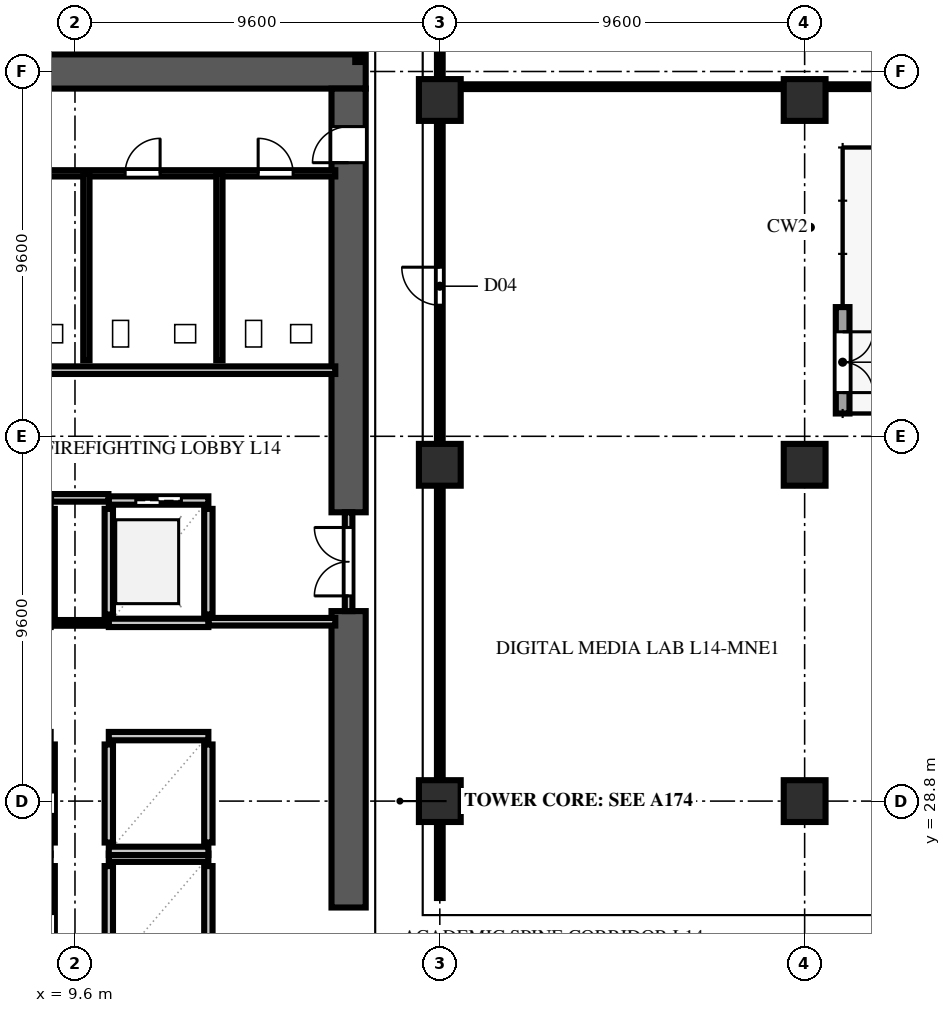
"""IFC4 building model, lengths in metres.
Left out: names, types, materials, properties, quantities, classifications, styles, units other than length and angle.
Written with IfcOpenShell. Run it as: python <this file> out.ifc"""

import sys

from ifc_helpers import new_model, si_unit, direction, frame, frame_2d, origin, origin_2d, place, context, subcontext, project, spatial, rectangle, extrude, element, fill, save


model = new_model("IFC4")
c1 = context("Model", 3, precision=1e-05, world=origin(), true_north=direction((0.0, 1.0)))
c2 = subcontext(c1, "Body", "Model", "MODEL_VIEW")
j1 = project(units=[si_unit("LENGTHUNIT", "METRE"), si_unit("PLANEANGLEUNIT", "RADIAN")], contexts=[c1])
p1 = place(None, origin())
s1 = spatial("IfcSite", under=j1, at=p1, CompositionType="ELEMENT")
p2 = place(p1, origin())
s2 = spatial("IfcBuilding", under=s1, at=p2, CompositionType="ELEMENT")
p3 = place(p2, frame((0.0, 0.0, 58.4)))
s3 = spatial("IfcBuildingStorey", under=s2, at=p3, CompositionType="ELEMENT", Elevation=58.4)
p4 = place(p3, frame((2.65, 48.0, 0.0), z_axis=(0.0, 0.0, 1.0), x_axis=(1.0, 0.0, 0.0)))
e1 = element("IfcWall", 1, at=p4, inside=s3, PredefinedType="SHEAR", context=c2, shape_type="SweptSolid", body=[
    extrude(rectangle(XDim=14.6, YDim=0.9, at=frame_2d((7.3, 0.0))), origin(), (0.0, 0.0, 1.0), 3.54),
])
p5 = place(p3, frame((16.8, 26.0, 0.0), z_axis=(0.0, 0.0, 1.0), x_axis=(0.0, 1.0, 0.0)))
e2 = element("IfcWall", 2, at=p5, inside=s3, PredefinedType="SHEAR", context=c2, shape_type="SweptSolid", body=[
    extrude(rectangle(XDim=7.8, YDim=0.9, at=frame_2d((3.9, 0.0))), origin(), (0.0, 0.0, 1.0), 3.54),
])
p6 = place(p3, frame((16.8, 36.4, 0.0), z_axis=(0.0, 0.0, 1.0), x_axis=(0.0, 1.0, 0.0)))
e3 = element("IfcWall", 3, at=p6, inside=s3, PredefinedType="SHEAR", context=c2, shape_type="SweptSolid", body=[
    extrude(rectangle(XDim=11.15, YDim=0.9, at=frame_2d((5.575, 0.0))), origin(), (0.0, 0.0, 1.0), 3.54),
])
p7 = place(p6, frame((9.2, 0.0, 0.0)))
e4 = element("IfcOpeningElement", 4, at=p7, cuts=e3, PredefinedType="OPENING", context=c2, shape_type="SweptSolid", body=[
    extrude(rectangle(XDim=0.95, YDim=2.15, at=frame_2d((0.475, 1.075))), frame((0.0, 0.462, 0.0), z_axis=(0.0, -1.0, 0.0), x_axis=(1.0, 0.0, 0.0)), (0.0, 0.0, 1.0), 0.924),
])
for number, where, z_axis, x_axis in (
    (5, (19.2, 28.8, 0.0), (0.0, 0.0, 1.0), (1.0, 0.0, 0.0)),
    (6, (19.2, 37.65, 0.0), (0.0, 0.0, 1.0), (1.0, 0.0, 0.0)),
    (7, (19.2, 47.25, 0.0), (0.0, 0.0, 1.0), (1.0, 0.0, 0.0)),
    (8, (28.8, 28.8, 0.0), (0.0, 0.0, 1.0), (1.0, 0.0, 0.0)),
    (9, (28.8, 37.65, 0.0), (0.0, 0.0, 1.0), (1.0, 0.0, 0.0)),
    (10, (28.8, 47.25, 0.0), (0.0, 0.0, 1.0), (1.0, 0.0, 0.0)),
):
    element("IfcColumn", number, at=place(p3, frame(where, z_axis=z_axis, x_axis=x_axis)), inside=s3, PredefinedType="COLUMN", context=c2, shape_type="SweptSolid", body=[
        extrude(rectangle(XDim=1.1, YDim=1.1, at=origin_2d()), origin(), (0.0, 0.0, 1.0), 3.8),
    ])
p8 = place(p3, frame((29.8, 39.0, 0.0), z_axis=(0.0, 0.0, 1.0), x_axis=(0.0, 1.0, 0.0)))
e11 = element("IfcWall", 11, at=p8, inside=s3, PredefinedType="SOLIDWALL", context=c2, shape_type="SweptSolid", body=[
    extrude(rectangle(XDim=2.8, YDim=0.36, at=frame_2d((1.4, 0.0))), origin(), (0.0, 0.0, 1.0), 3.54),
])
p9 = place(p8, frame((0.55, 0.0, 0.0)))
e12 = element("IfcOpeningElement", 12, at=p9, cuts=e11, PredefinedType="OPENING", context=c2, shape_type="SweptSolid", body=[
    extrude(rectangle(XDim=1.6, YDim=2.3, at=frame_2d((0.8, 1.15))), frame((0.0, 0.192, 0.0), z_axis=(0.0, -1.0, 0.0), x_axis=(1.0, 0.0, 0.0)), (0.0, 0.0, 1.0), 0.384),
])
p10 = place(p3, frame((8.96, 24.51, 0.0), z_axis=(0.0, 0.0, 1.0), x_axis=(0.0, 1.0, 0.0)))
e13 = element("IfcWall", 13, at=p10, inside=s3, PredefinedType="SOLIDWALL", context=c2, shape_type="SweptSolid", body=[
    extrude(rectangle(XDim=2.58, YDim=0.22, at=frame_2d((1.29, 0.0))), origin(), (0.0, 0.0, 1.0), 3.54),
])
p11 = place(p10, frame((0.74, 0.0, 0.0)))
e14 = element("IfcOpeningElement", 14, at=p11, cuts=e13, PredefinedType="OPENING", context=c2, shape_type="SweptSolid", body=[
    extrude(rectangle(XDim=1.1, YDim=2.2, at=frame_2d((0.55, 1.1))), frame((0.0, 0.122, 0.0), z_axis=(0.0, -1.0, 0.0), x_axis=(1.0, 0.0, 0.0)), (0.0, 0.0, 1.0), 0.244),
])
p12 = place(p3, frame((8.96, 27.71, 0.0), z_axis=(0.0, 0.0, 1.0), x_axis=(0.0, 1.0, 0.0)))
e15 = element("IfcWall", 15, at=p12, inside=s3, PredefinedType="SOLIDWALL", context=c2, shape_type="SweptSolid", body=[
    extrude(rectangle(XDim=2.58, YDim=0.22, at=frame_2d((1.29, 0.0))), origin(), (0.0, 0.0, 1.0), 3.54),
])
p13 = place(p12, frame((0.74, 0.0, 0.0)))
e16 = element("IfcOpeningElement", 16, at=p13, cuts=e15, PredefinedType="OPENING", context=c2, shape_type="SweptSolid", body=[
    extrude(rectangle(XDim=1.1, YDim=2.2, at=frame_2d((0.55, 1.1))), frame((0.0, 0.122, 0.0), z_axis=(0.0, -1.0, 0.0), x_axis=(1.0, 0.0, 0.0)), (0.0, 0.0, 1.0), 0.244),
])
for number, where, z_axis, x_axis in (
    (17, (10.49, 24.51, 0.0), (0.0, 0.0, 1.0), (0.0, 1.0, 0.0)),
    (18, (13.11, 24.51, 0.0), (0.0, 0.0, 1.0), (0.0, 1.0, 0.0)),
):
    element("IfcWall", number, at=place(p3, frame(where, z_axis=z_axis, x_axis=x_axis)), inside=s3, PredefinedType="SOLIDWALL", context=c2, shape_type="SweptSolid", body=[
        extrude(rectangle(XDim=2.58, YDim=0.22, at=frame_2d((1.29, 0.0))), origin(), (0.0, 0.0, 1.0), 3.54),
    ])
p14 = place(p3, frame((10.49, 27.31, 0.0), z_axis=(0.0, 0.0, 1.0), x_axis=(1.0, 0.0, 0.0)))
e19 = element("IfcWall", 19, at=p14, inside=s3, PredefinedType="SOLIDWALL", context=c2, shape_type="SweptSolid", body=[
    extrude(rectangle(XDim=2.62, YDim=0.22, at=frame_2d((1.31, 0.0))), origin(), (0.0, 0.0, 1.0), 3.54),
])
for number, where, z_axis, x_axis in (
    (20, (10.49, 27.71, 0.0), (0.0, 0.0, 1.0), (0.0, 1.0, 0.0)),
    (21, (13.11, 27.71, 0.0), (0.0, 0.0, 1.0), (0.0, 1.0, 0.0)),
):
    element("IfcWall", number, at=place(p3, frame(where, z_axis=z_axis, x_axis=x_axis)), inside=s3, PredefinedType="SOLIDWALL", context=c2, shape_type="SweptSolid", body=[
        extrude(rectangle(XDim=2.58, YDim=0.22, at=frame_2d((1.29, 0.0))), origin(), (0.0, 0.0, 1.0), 3.54),
    ])
for number, where, z_axis, x_axis in (
    (22, (10.49, 27.49, 0.0), (0.0, 0.0, 1.0), (1.0, 0.0, 0.0)),
    (23, (10.49, 30.51, 0.0), (0.0, 0.0, 1.0), (1.0, 0.0, 0.0)),
):
    element("IfcWall", number, at=place(p3, frame(where, z_axis=z_axis, x_axis=x_axis)), inside=s3, PredefinedType="SOLIDWALL", context=c2, shape_type="SweptSolid", body=[
        extrude(rectangle(XDim=2.62, YDim=0.22, at=frame_2d((1.31, 0.0))), origin(), (0.0, 0.0, 1.0), 3.54),
    ])
for number, where, z_axis, x_axis in (
    (24, (8.96, 33.71, 0.0), (0.0, 0.0, 1.0), (0.0, 1.0, 0.0)),
    (25, (10.49, 33.71, 0.0), (0.0, 0.0, 1.0), (0.0, 1.0, 0.0)),
    (26, (13.11, 33.71, 0.0), (0.0, 0.0, 1.0), (0.0, 1.0, 0.0)),
):
    element("IfcWall", number, at=place(p3, frame(where, z_axis=z_axis, x_axis=x_axis)), inside=s3, PredefinedType="SOLIDWALL", context=c2, shape_type="SweptSolid", body=[
        extrude(rectangle(XDim=2.78, YDim=0.22, at=frame_2d((1.39, 0.0))), origin(), (0.0, 0.0, 1.0), 3.54),
    ])
p15 = place(p3, frame((10.49, 33.49, 0.0), z_axis=(0.0, 0.0, 1.0), x_axis=(1.0, 0.0, 0.0)))
e27 = element("IfcWall", 27, at=p15, inside=s3, PredefinedType="SOLIDWALL", context=c2, shape_type="SweptSolid", body=[
    extrude(rectangle(XDim=2.62, YDim=0.22, at=frame_2d((1.31, 0.0))), origin(), (0.0, 0.0, 1.0), 3.54),
])
p16 = place(p3, frame((10.49, 36.71, 0.0), z_axis=(0.0, 0.0, 1.0), x_axis=(1.0, 0.0, 0.0)))
e28 = element("IfcWall", 28, at=p16, inside=s3, PredefinedType="SOLIDWALL", context=c2, shape_type="SweptSolid", body=[
    extrude(rectangle(XDim=2.62, YDim=0.22, at=frame_2d((1.31, 0.0))), origin(), (0.0, 0.0, 1.0), 3.54),
])
p17 = place(p16, frame((0.71, 0.0, 0.0)))
e29 = element("IfcOpeningElement", 29, at=p17, cuts=e28, PredefinedType="OPENING", context=c2, shape_type="SweptSolid", body=[
    extrude(rectangle(XDim=1.2, YDim=2.2, at=frame_2d((0.6, 1.1))), frame((0.0, 0.122, 0.0), z_axis=(0.0, -1.0, 0.0), x_axis=(1.0, 0.0, 0.0)), (0.0, 0.0, 1.0), 0.244),
])
p18 = place(p3, frame((8.97, 36.78, 0.0), z_axis=(0.0, 0.0, 1.0), x_axis=(1.0, 0.0, 0.0)))
e30 = element("IfcWall", 30, at=p18, inside=s3, PredefinedType="SOLIDWALL", context=c2, shape_type="SweptSolid", body=[
    extrude(rectangle(XDim=1.51, YDim=0.2, at=frame_2d((0.755, 0.0))), origin(), (0.0, 0.0, 1.0), 3.54),
])
p19 = place(p3, frame((13.12, 33.52, 0.0), z_axis=(0.0, 0.0, 1.0), x_axis=(1.0, 0.0, 0.0)))
e31 = element("IfcWall", 31, at=p19, inside=s3, PredefinedType="SOLIDWALL", context=c2, shape_type="SweptSolid", body=[
    extrude(rectangle(XDim=3.33, YDim=0.2, at=frame_2d((1.665, 0.0))), origin(), (0.0, 0.0, 1.0), 3.54),
])
p20 = place(p3, frame((6.32, 40.14, 0.0), z_axis=(0.0, 0.0, 1.0), x_axis=(1.0, 0.0, 0.0)))
e32 = element("IfcWall", 32, at=p20, inside=s3, PredefinedType="SOLIDWALL", context=c2, shape_type="SweptSolid", body=[
    extrude(rectangle(XDim=10.13, YDim=0.2, at=frame_2d((5.065, 0.0))), origin(), (0.0, 0.0, 1.0), 3.54),
])
p21 = place(p3, frame((16.8, 33.8, 0.0), z_axis=(0.0, 0.0, 1.0), x_axis=(0.0, 1.0, 0.0)))
e33 = element("IfcWall", 33, at=p21, inside=s3, PredefinedType="SOLIDWALL", context=c2, shape_type="SweptSolid", body=[
    extrude(rectangle(XDim=2.6, YDim=0.2, at=frame_2d((1.3, 0.0))), origin(), (0.0, 0.0, 1.0), 3.54),
])
p22 = place(p21, frame((0.4, 0.0, 0.0)))
e34 = element("IfcOpeningElement", 34, at=p22, cuts=e33, PredefinedType="OPENING", context=c2, shape_type="SweptSolid", body=[
    extrude(rectangle(XDim=1.8, YDim=2.2, at=frame_2d((0.9, 1.1))), frame((0.0, 0.112, 0.0), z_axis=(0.0, -1.0, 0.0), x_axis=(1.0, 0.0, 0.0)), (0.0, 0.0, 1.0), 0.224),
])
p23 = place(p3, frame((8.965, 33.49, 0.0), z_axis=(0.0, 0.0, 1.0), x_axis=(1.0, 0.0, 0.0)))
e35 = element("IfcWall", 35, at=p23, inside=s3, PredefinedType="PARTITIONING", context=c2, shape_type="SweptSolid", body=[
    extrude(rectangle(XDim=1.52, YDim=0.15, at=frame_2d((0.76, 0.0))), origin(), (0.0, 0.0, 1.0), 3.54),
])
p24 = place(p3, frame((6.32, 45.32, 0.0), z_axis=(0.0, 0.0, 1.0), x_axis=(1.0, 0.0, 0.0)))
e36 = element("IfcWall", 36, at=p24, inside=s3, PredefinedType="PLUMBINGWALL", context=c2, shape_type="SweptSolid", body=[
    extrude(rectangle(XDim=10.13, YDim=0.165, at=frame_2d((5.065, 0.0))), origin(), (0.0, 0.0, 1.0), 3.54),
])
p25 = place(p24, frame((0.9, 0.0, 0.0)))
e37 = element("IfcOpeningElement", 37, at=p25, cuts=e36, PredefinedType="OPENING", context=c2, shape_type="SweptSolid", body=[
    extrude(rectangle(XDim=0.92, YDim=2.15, at=frame_2d((0.46, 1.075))), frame((0.0, 0.094, 0.0), z_axis=(0.0, -1.0, 0.0), x_axis=(1.0, 0.0, 0.0)), (0.0, 0.0, 1.0), 0.189),
])
p26 = place(p24, frame((4.6, 0.0, 0.0)))
e38 = element("IfcOpeningElement", 38, at=p26, cuts=e36, PredefinedType="OPENING", context=c2, shape_type="SweptSolid", body=[
    extrude(rectangle(XDim=0.92, YDim=2.15, at=frame_2d((0.46, 1.075))), frame((0.0, 0.094, 0.0), z_axis=(0.0, -1.0, 0.0), x_axis=(1.0, 0.0, 0.0)), (0.0, 0.0, 1.0), 0.189),
])
p27 = place(p24, frame((8.1, 0.0, 0.0)))
e39 = element("IfcOpeningElement", 39, at=p27, cuts=e36, PredefinedType="OPENING", context=c2, shape_type="SweptSolid", body=[
    extrude(rectangle(XDim=0.92, YDim=2.15, at=frame_2d((0.46, 1.075))), frame((0.0, 0.094, 0.0), z_axis=(0.0, -1.0, 0.0), x_axis=(1.0, 0.0, 0.0)), (0.0, 0.0, 1.0), 0.189),
])
for number, where, z_axis, x_axis in (
    (40, (9.9, 40.4, 0.0), (0.0, 0.0, 1.0), (0.0, 1.0, 0.0)),
    (41, (13.4, 40.4, 0.0), (0.0, 0.0, 1.0), (0.0, 1.0, 0.0)),
):
    element("IfcWall", number, at=place(p3, frame(where, z_axis=z_axis, x_axis=x_axis)), inside=s3, PredefinedType="PLUMBINGWALL", context=c2, shape_type="SweptSolid", body=[
        extrude(rectangle(XDim=4.92, YDim=0.165, at=frame_2d((2.46, 0.0))), origin(), (0.0, 0.0, 1.0), 3.54),
    ])
p28 = place(p3, frame((19.2, 26.25, 0.0), z_axis=(0.0, 0.0, 1.0), x_axis=(0.0, 1.0, 0.0)))
e42 = element("IfcWall", 42, at=p28, inside=s3, PredefinedType="PARTITIONING", context=c2, shape_type="SweptSolid", body=[
    extrude(rectangle(XDim=21.0, YDim=0.15, at=frame_2d((10.5, 0.0))), origin(), (0.0, 0.0, 1.0), 2.845),
])
p29 = place(p28, frame((15.6, 0.0, 0.0)))
e43 = element("IfcOpeningElement", 43, at=p29, cuts=e42, PredefinedType="OPENING", context=c2, shape_type="SweptSolid", body=[
    extrude(rectangle(XDim=1.0, YDim=2.2, at=frame_2d((0.5, 1.1))), frame((0.0, 0.087, 0.0), z_axis=(0.0, -1.0, 0.0), x_axis=(1.0, 0.0, 0.0)), (0.0, 0.0, 1.0), 0.174),
])
p30 = place(p3, frame((19.2, 47.25, 0.0), z_axis=(0.0, 0.0, 1.0), x_axis=(0.0, 1.0, 0.0)))
e44 = element("IfcWall", 44, at=p30, inside=s3, PredefinedType="PARTITIONING", context=c2, shape_type="SweptSolid", body=[
    extrude(rectangle(XDim=0.35, YDim=0.15, at=frame_2d((0.175, 0.0))), origin(), (0.0, 0.0, 1.0), 3.54),
])
p31 = place(p3, frame((19.2, 47.6, 0.0), z_axis=(0.0, 0.0, 1.0), x_axis=(1.0, 0.0, 0.0)))
e45 = element("IfcWall", 45, at=p31, inside=s3, PredefinedType="PARTITIONING", context=c2, shape_type="SweptSolid", body=[
    extrude(rectangle(XDim=18.98, YDim=0.125, at=frame_2d((9.49, 0.0))), origin(), (0.0, 0.0, 1.0), 3.54),
])
p32 = place(p3, frame((19.2, 47.6, 0.0), z_axis=(0.0, 0.0, 1.0), x_axis=(0.0, 1.0, 0.0)))
e46 = element("IfcWall", 46, at=p32, inside=s3, PredefinedType="PARTITIONING", context=c2, shape_type="SweptSolid", body=[
    extrude(rectangle(XDim=18.85, YDim=0.15, at=frame_2d((9.425, 0.0))), origin(), (0.0, 0.0, 1.0), 2.845),
])
p33 = place(p32, frame((3.95, 0.0, 0.0)))
e47 = element("IfcOpeningElement", 47, at=p33, cuts=e46, PredefinedType="OPENING", context=c2, shape_type="SweptSolid", body=[
    extrude(rectangle(XDim=0.95, YDim=2.15, at=frame_2d((0.475, 1.075))), frame((0.0, 0.087, 0.0), z_axis=(0.0, -1.0, 0.0), x_axis=(1.0, 0.0, 0.0)), (0.0, 0.0, 1.0), 0.174),
])
p34 = place(p3, frame((17.05, 48.25, 0.0), z_axis=(0.0, 0.0, 1.0), x_axis=(0.0, 1.0, 0.0)))
e48 = element("IfcWall", 48, at=p34, inside=s3, PredefinedType="PARTITIONING", context=c2, shape_type="SweptSolid", body=[
    extrude(rectangle(XDim=18.73, YDim=0.15, at=frame_2d((9.365, 0.0))), origin(), (0.0, 0.0, 1.0), 3.54),
])
p35 = place(p34, frame((3.4, 0.0, 0.0)))
e49 = element("IfcOpeningElement", 49, at=p35, cuts=e48, PredefinedType="OPENING", context=c2, shape_type="SweptSolid", body=[
    extrude(rectangle(XDim=0.95, YDim=2.15, at=frame_2d((0.475, 1.075))), frame((0.0, 0.087, 0.0), z_axis=(0.0, -1.0, 0.0), x_axis=(1.0, 0.0, 0.0)), (0.0, 0.0, 1.0), 0.174),
])
p36 = place(p9, frame((1.6, 0.0, 0.0), z_axis=(0.0, 0.0, 1.0), x_axis=(-1.0, 0.0, 0.0)))
e50 = element("IfcDoor", 50, at=p36, inside=s3, OperationType="DOUBLE_SWING_LEFT", PredefinedType="DOOR", context=c2, shape_type="SweptSolid", body=[
    extrude(rectangle(XDim=1.6, YDim=2.3, at=frame_2d((0.8, 1.15))), frame((0.0, 0.025, 0.0), z_axis=(0.0, -1.0, 0.0), x_axis=(1.0, 0.0, 0.0)), (0.0, 0.0, 1.0), 0.05),
])
fill(e12, e50)
p37 = place(p17, origin())
e51 = element("IfcDoor", 51, at=p37, inside=s3, OperationType="DOUBLE_DOOR_SLIDING", PredefinedType="DOOR", context=c2, shape_type="SweptSolid", body=[
    extrude(rectangle(XDim=1.2, YDim=2.2, at=frame_2d((0.6, 1.1))), frame((0.0, 0.025, 0.0), z_axis=(0.0, -1.0, 0.0), x_axis=(1.0, 0.0, 0.0)), (0.0, 0.0, 1.0), 0.05),
])
fill(e29, e51)
p38 = place(p7, origin())
e52 = element("IfcDoor", 52, at=p38, inside=s3, OperationType="SINGLE_SWING_LEFT", PredefinedType="DOOR", context=c2, shape_type="SweptSolid", body=[
    extrude(rectangle(XDim=0.95, YDim=2.15, at=frame_2d((0.475, 1.075))), frame((0.0, 0.025, 0.0), z_axis=(0.0, -1.0, 0.0), x_axis=(1.0, 0.0, 0.0)), (0.0, 0.0, 1.0), 0.05),
])
fill(e4, e52)
p39 = place(p22, origin())
e53 = element("IfcDoor", 53, at=p39, inside=s3, OperationType="DOUBLE_DOOR_SINGLE_SWING", PredefinedType="DOOR", context=c2, shape_type="SweptSolid", body=[
    extrude(rectangle(XDim=1.8, YDim=2.2, at=frame_2d((0.9, 1.1))), frame((0.0, 0.025, 0.0), z_axis=(0.0, -1.0, 0.0), x_axis=(1.0, 0.0, 0.0)), (0.0, 0.0, 1.0), 0.05),
])
fill(e34, e53)
p40 = place(p26, origin())
e54 = element("IfcDoor", 54, at=p40, inside=s3, OperationType="SINGLE_SWING_RIGHT", PredefinedType="DOOR", context=c2, shape_type="SweptSolid", body=[
    extrude(rectangle(XDim=0.92, YDim=2.15, at=frame_2d((0.46, 1.075))), frame((0.0, 0.025, 0.0), z_axis=(0.0, -1.0, 0.0), x_axis=(1.0, 0.0, 0.0)), (0.0, 0.0, 1.0), 0.05),
])
fill(e38, e54)
p41 = place(p27, origin())
e55 = element("IfcDoor", 55, at=p41, inside=s3, OperationType="SINGLE_SWING_LEFT", PredefinedType="DOOR", context=c2, shape_type="SweptSolid", body=[
    extrude(rectangle(XDim=0.92, YDim=2.15, at=frame_2d((0.46, 1.075))), frame((0.0, 0.025, 0.0), z_axis=(0.0, -1.0, 0.0), x_axis=(1.0, 0.0, 0.0)), (0.0, 0.0, 1.0), 0.05),
])
fill(e39, e55)
p42 = place(p29, origin())
e56 = element("IfcDoor", 56, at=p42, inside=s3, OperationType="SINGLE_SWING_RIGHT", PredefinedType="DOOR", context=c2, shape_type="SweptSolid", body=[
    extrude(rectangle(XDim=1.0, YDim=2.2, at=frame_2d((0.5, 1.1))), frame((0.0, 0.025, 0.0), z_axis=(0.0, -1.0, 0.0), x_axis=(1.0, 0.0, 0.0)), (0.0, 0.0, 1.0), 0.05),
])
fill(e43, e56)
save(model, sys.argv[1])
